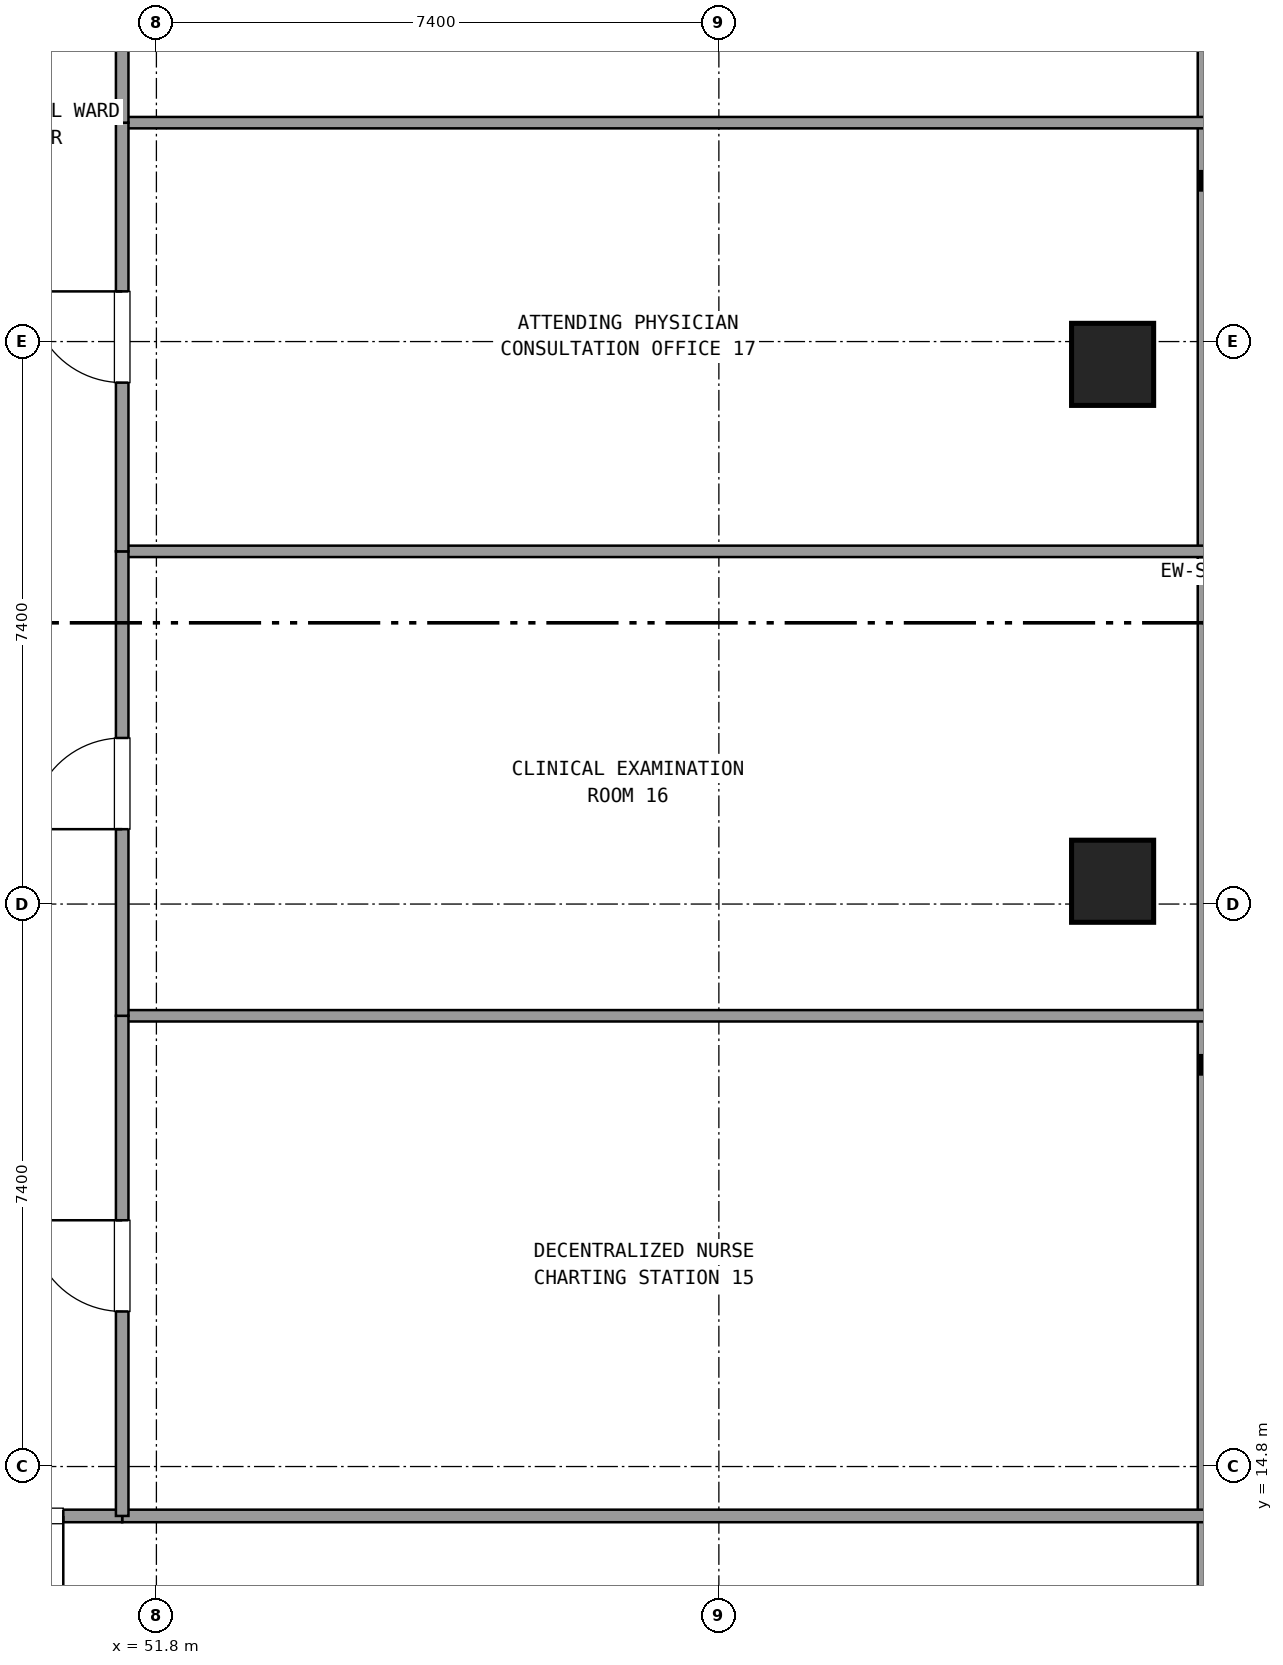
"""IFC4 building model, lengths in metres.
Left out: names, types, materials, properties, quantities, classifications, styles, units other than length and angle.
Written with IfcOpenShell. Run it as: python <this file> out.ifc"""

import sys

from ifc_helpers import new_model, si_unit, direction, frame, frame_2d, origin, origin_2d, place, context, subcontext, project, spatial, rectangle, extrude, element, fill, save


model = new_model("IFC4")
c1 = context("Model", 3, precision=1e-05, world=origin(), true_north=direction((0.0, 1.0)))
c2 = subcontext(c1, "Body", "Model", "MODEL_VIEW")
j1 = project(units=[si_unit("LENGTHUNIT", "METRE"), si_unit("PLANEANGLEUNIT", "RADIAN")], contexts=[c1])
p1 = place(None, origin())
s1 = spatial("IfcSite", under=j1, at=p1, CompositionType="ELEMENT")
p2 = place(p1, origin())
s2 = spatial("IfcBuilding", under=s1, at=p2, CompositionType="ELEMENT")
p3 = place(p2, frame((0.0, 0.0, 23.94)))
s3 = spatial("IfcBuildingStorey", under=s2, at=p3, CompositionType="ELEMENT", Elevation=23.94)
for number, where, z_axis, x_axis in (
    (1, (64.38, 22.5, 0.0), (0.0, 0.0, 1.0), (1.0, 0.0, 0.0)),
    (2, (64.38, 29.3, 0.0), (0.0, 0.0, 1.0), (1.0, 0.0, 0.0)),
):
    element("IfcColumn", number, at=place(p3, frame(where, z_axis=z_axis, x_axis=x_axis)), inside=s3, PredefinedType="COLUMN", context=c2, shape_type="SweptSolid", body=[
        extrude(rectangle(XDim=1.08, YDim=1.08, at=origin_2d()), origin(), (0.0, 0.0, 1.0), 3.6),
    ])
p4 = place(p3, frame((65.62, 8.455, 0.0), z_axis=(0.0, 0.0, 1.0), x_axis=(0.0, 1.0, 0.0)))
e3 = element("IfcWall", 3, at=p4, inside=s3, PredefinedType="SOLIDWALL", context=c2, shape_type="SweptSolid", body=[
    extrude(rectangle(XDim=34.89, YDim=0.24, at=frame_2d((17.445, 0.0))), origin(), (0.0, 0.0, 1.0), 0.85),
])
p5 = place(p3, frame((51.35, 14.15, 0.0), z_axis=(0.0, 0.0, 1.0), x_axis=(1.0, 0.0, 0.0)))
e4 = element("IfcWall", 4, at=p5, inside=s3, PredefinedType="PARTITIONING", context=c2, shape_type="SweptSolid", body=[
    extrude(rectangle(XDim=14.25, YDim=0.165, at=frame_2d((7.125, 0.0))), origin(), (0.0, 0.0, 1.0), 2.61),
])
p6 = place(p3, frame((48.8, 14.15, 0.0), z_axis=(0.0, 0.0, 1.0), x_axis=(1.0, 0.0, 0.0)))
e5 = element("IfcWall", 5, at=p6, inside=s3, PredefinedType="PARTITIONING", context=c2, shape_type="SweptSolid", body=[
    extrude(rectangle(XDim=2.55, YDim=0.165, at=frame_2d((1.275, 0.0))), origin(), (0.0, 0.0, 1.0), 2.61),
])
p7 = place(p6, frame((0.775, 0.0, 0.0)))
e6 = element("IfcOpeningElement", 6, at=p7, cuts=e5, PredefinedType="OPENING", context=c2, shape_type="SweptSolid", body=[
    extrude(rectangle(XDim=1.0, YDim=2.15, at=frame_2d((0.5, 1.075))), frame((0.0, 0.093, 0.0), z_axis=(0.0, -1.0, 0.0), x_axis=(1.0, 0.0, 0.0)), (0.0, 0.0, 1.0), 0.185),
])
p8 = place(p3, frame((51.35, 20.73, 0.0), z_axis=(0.0, 0.0, 1.0), x_axis=(1.0, 0.0, 0.0)))
e7 = element("IfcWall", 7, at=p8, inside=s3, PredefinedType="PARTITIONING", context=c2, shape_type="SweptSolid", body=[
    extrude(rectangle(XDim=14.25, YDim=0.15, at=frame_2d((7.125, 0.0))), origin(), (0.0, 0.0, 1.0), 2.61),
])
p9 = place(p3, frame((51.35, 14.15, 0.0), z_axis=(0.0, 0.0, 1.0), x_axis=(0.0, 1.0, 0.0)))
e8 = element("IfcWall", 8, at=p9, inside=s3, PredefinedType="PARTITIONING", context=c2, shape_type="SweptSolid", body=[
    extrude(rectangle(XDim=6.58, YDim=0.165, at=frame_2d((3.29, 0.0))), origin(), (0.0, 0.0, 1.0), 2.61),
])
p10 = place(p9, frame((2.69, 0.0, 0.0)))
e9 = element("IfcOpeningElement", 9, at=p10, cuts=e8, PredefinedType="OPENING", context=c2, shape_type="SweptSolid", body=[
    extrude(rectangle(XDim=1.2, YDim=2.15, at=frame_2d((0.6, 1.075))), frame((0.0, 0.093, 0.0), z_axis=(0.0, -1.0, 0.0), x_axis=(1.0, 0.0, 0.0)), (0.0, 0.0, 1.0), 0.185),
])
p11 = place(p3, frame((51.35, 26.84, 0.0), z_axis=(0.0, 0.0, 1.0), x_axis=(1.0, 0.0, 0.0)))
e10 = element("IfcWall", 10, at=p11, inside=s3, PredefinedType="PARTITIONING", context=c2, shape_type="SweptSolid", body=[
    extrude(rectangle(XDim=14.25, YDim=0.15, at=frame_2d((7.125, 0.0))), origin(), (0.0, 0.0, 1.0), 2.61),
])
p12 = place(p3, frame((51.35, 20.73, 0.0), z_axis=(0.0, 0.0, 1.0), x_axis=(0.0, 1.0, 0.0)))
e11 = element("IfcWall", 11, at=p12, inside=s3, PredefinedType="PARTITIONING", context=c2, shape_type="SweptSolid", body=[
    extrude(rectangle(XDim=6.11, YDim=0.165, at=frame_2d((3.055, 0.0))), origin(), (0.0, 0.0, 1.0), 2.61),
])
p13 = place(p12, frame((2.455, 0.0, 0.0)))
e12 = element("IfcOpeningElement", 12, at=p13, cuts=e11, PredefinedType="OPENING", context=c2, shape_type="SweptSolid", body=[
    extrude(rectangle(XDim=1.2, YDim=2.15, at=frame_2d((0.6, 1.075))), frame((0.0, 0.093, 0.0), z_axis=(0.0, -1.0, 0.0), x_axis=(1.0, 0.0, 0.0)), (0.0, 0.0, 1.0), 0.185),
])
p14 = place(p3, frame((51.35, 32.48, 0.0), z_axis=(0.0, 0.0, 1.0), x_axis=(1.0, 0.0, 0.0)))
e13 = element("IfcWall", 13, at=p14, inside=s3, PredefinedType="PARTITIONING", context=c2, shape_type="SweptSolid", body=[
    extrude(rectangle(XDim=14.25, YDim=0.15, at=frame_2d((7.125, 0.0))), origin(), (0.0, 0.0, 1.0), 2.61),
])
p15 = place(p3, frame((51.35, 26.84, 0.0), z_axis=(0.0, 0.0, 1.0), x_axis=(0.0, 1.0, 0.0)))
e14 = element("IfcWall", 14, at=p15, inside=s3, PredefinedType="PARTITIONING", context=c2, shape_type="SweptSolid", body=[
    extrude(rectangle(XDim=5.64, YDim=0.165, at=frame_2d((2.82, 0.0))), origin(), (0.0, 0.0, 1.0), 2.61),
])
p16 = place(p15, frame((2.22, 0.0, 0.0)))
e15 = element("IfcOpeningElement", 15, at=p16, cuts=e14, PredefinedType="OPENING", context=c2, shape_type="SweptSolid", body=[
    extrude(rectangle(XDim=1.2, YDim=2.15, at=frame_2d((0.6, 1.075))), frame((0.0, 0.093, 0.0), z_axis=(0.0, -1.0, 0.0), x_axis=(1.0, 0.0, 0.0)), (0.0, 0.0, 1.0), 0.185),
])
p17 = place(p3, frame((51.35, 32.48, 0.0), z_axis=(0.0, 0.0, 1.0), x_axis=(0.0, 1.0, 0.0)))
e16 = element("IfcWall", 16, at=p17, inside=s3, PredefinedType="PARTITIONING", context=c2, shape_type="SweptSolid", body=[
    extrude(rectangle(XDim=5.17, YDim=0.165, at=frame_2d((2.585, 0.0))), origin(), (0.0, 0.0, 1.0), 2.61),
])
p18 = place(p17, frame((1.985, 0.0, 0.0)))
e17 = element("IfcOpeningElement", 17, at=p18, cuts=e16, PredefinedType="OPENING", context=c2, shape_type="SweptSolid", body=[
    extrude(rectangle(XDim=1.2, YDim=2.15, at=frame_2d((0.6, 1.075))), frame((0.0, 0.093, 0.0), z_axis=(0.0, -1.0, 0.0), x_axis=(1.0, 0.0, 0.0)), (0.0, 0.0, 1.0), 0.185),
])
p19 = place(p7, frame((1.0, 0.0, 0.0), z_axis=(0.0, 0.0, 1.0), x_axis=(-1.0, 0.0, 0.0)))
e18 = element("IfcDoor", 18, at=p19, inside=s3, OperationType="SINGLE_SWING_RIGHT", PredefinedType="DOOR", context=c2, shape_type="SweptSolid", body=[
    extrude(rectangle(XDim=1.0, YDim=2.15, at=frame_2d((0.5, 1.075))), frame((0.0, 0.025, 0.0), z_axis=(0.0, -1.0, 0.0), x_axis=(1.0, 0.0, 0.0)), (0.0, 0.0, 1.0), 0.05),
])
fill(e6, e18)
p20 = place(p10, origin())
e19 = element("IfcDoor", 19, at=p20, inside=s3, OperationType="SINGLE_SWING_RIGHT", PredefinedType="DOOR", context=c2, shape_type="SweptSolid", body=[
    extrude(rectangle(XDim=1.2, YDim=2.15, at=frame_2d((0.6, 1.075))), frame((0.0, 0.025, 0.0), z_axis=(0.0, -1.0, 0.0), x_axis=(1.0, 0.0, 0.0)), (0.0, 0.0, 1.0), 0.05),
])
fill(e9, e19)
p21 = place(p13, origin())
e20 = element("IfcDoor", 20, at=p21, inside=s3, OperationType="SINGLE_SWING_LEFT", PredefinedType="DOOR", context=c2, shape_type="SweptSolid", body=[
    extrude(rectangle(XDim=1.2, YDim=2.15, at=frame_2d((0.6, 1.075))), frame((0.0, 0.025, 0.0), z_axis=(0.0, -1.0, 0.0), x_axis=(1.0, 0.0, 0.0)), (0.0, 0.0, 1.0), 0.05),
])
fill(e12, e20)
p22 = place(p16, origin())
e21 = element("IfcDoor", 21, at=p22, inside=s3, OperationType="SINGLE_SWING_RIGHT", PredefinedType="DOOR", context=c2, shape_type="SweptSolid", body=[
    extrude(rectangle(XDim=1.2, YDim=2.15, at=frame_2d((0.6, 1.075))), frame((0.0, 0.025, 0.0), z_axis=(0.0, -1.0, 0.0), x_axis=(1.0, 0.0, 0.0)), (0.0, 0.0, 1.0), 0.05),
])
fill(e15, e21)
save(model, sys.argv[1])
